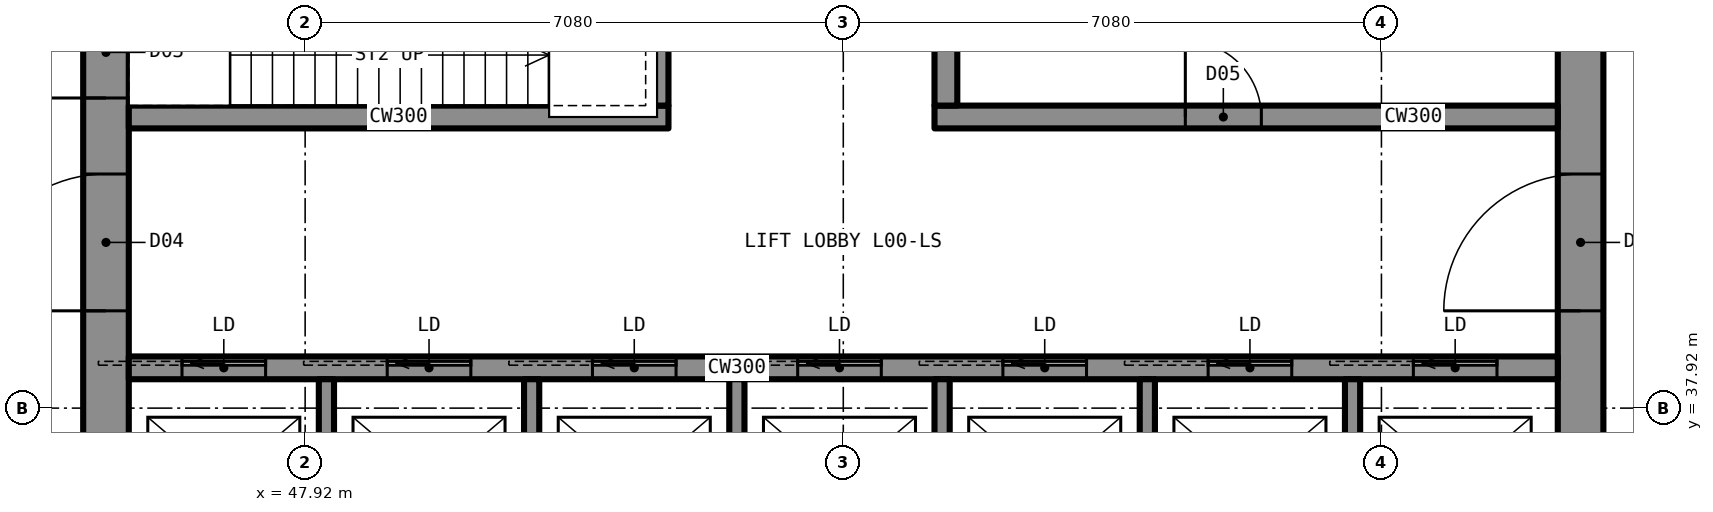
"""IFC4 building model, lengths in metres.
Left out: names, types, materials, properties, quantities, classifications, styles, units other than length and angle.
Written with IfcOpenShell. Run it as: python <this file> out.ifc"""

import sys

from ifc_helpers import new_model, si_unit, direction, frame, frame_2d, origin, place, context, subcontext, project, spatial, rectangle, extrude, element, fill, save


model = new_model("IFC4")
c1 = context("Model", 3, precision=1e-05, world=origin(), true_north=direction((0.0, 1.0)))
c2 = subcontext(c1, "Body", "Model", "MODEL_VIEW")
j1 = project(units=[si_unit("LENGTHUNIT", "METRE"), si_unit("PLANEANGLEUNIT", "RADIAN")], contexts=[c1])
p1 = place(None, origin())
s1 = spatial("IfcSite", under=j1, at=p1, CompositionType="ELEMENT")
p2 = place(p1, origin())
s2 = spatial("IfcBuilding", under=s1, at=p2, CompositionType="ELEMENT")
p3 = place(p2, origin())
s3 = spatial("IfcBuildingStorey", under=s2, at=p3, CompositionType="ELEMENT", Elevation=0.0)
p4 = place(p3, frame((64.7, 35.6, 0.0), z_axis=(0.0, 0.0, 1.0), x_axis=(0.0, 1.0, 0.0)))
e1 = element("IfcWall", 1, at=p4, inside=s3, PredefinedType="SHEAR", context=c2, shape_type="SweptSolid", body=[
    extrude(rectangle(XDim=18.8, YDim=0.6, at=frame_2d((9.4, 0.0))), origin(), (0.0, 0.0, 1.0), 5.6),
])
p5 = place(p4, frame((13.4, 0.0, 0.0)))
e2 = element("IfcOpeningElement", 2, at=p5, cuts=e1, PredefinedType="OPENING", context=c2, shape_type="SweptSolid", body=[
    extrude(rectangle(XDim=1.8, YDim=2.2, at=frame_2d((0.9, 1.1))), frame((0.0, 0.31, 0.0), z_axis=(0.0, -1.0, 0.0), x_axis=(1.0, 0.0, 0.0)), (0.0, 0.0, 1.0), 0.62),
])
p6 = place(p4, frame((3.6, 0.0, 0.0)))
e3 = element("IfcOpeningElement", 3, at=p6, cuts=e1, PredefinedType="OPENING", context=c2, shape_type="SweptSolid", body=[
    extrude(rectangle(XDim=1.8, YDim=2.2, at=frame_2d((0.9, 1.1))), frame((0.0, 0.31, 0.0), z_axis=(0.0, -1.0, 0.0), x_axis=(1.0, 0.0, 0.0)), (0.0, 0.0, 1.0), 0.62),
])
p7 = place(p3, frame((45.3, 35.6, 0.0), z_axis=(0.0, 0.0, 1.0), x_axis=(0.0, 1.0, 0.0)))
e4 = element("IfcWall", 4, at=p7, inside=s3, PredefinedType="SHEAR", context=c2, shape_type="SweptSolid", body=[
    extrude(rectangle(XDim=18.8, YDim=0.6, at=frame_2d((9.4, 0.0))), origin(), (0.0, 0.0, 1.0), 5.6),
])
p8 = place(p7, frame((13.4, 0.0, 0.0)))
e5 = element("IfcOpeningElement", 5, at=p8, cuts=e4, PredefinedType="OPENING", context=c2, shape_type="SweptSolid", body=[
    extrude(rectangle(XDim=1.8, YDim=2.2, at=frame_2d((0.9, 1.1))), frame((0.0, 0.31, 0.0), z_axis=(0.0, -1.0, 0.0), x_axis=(1.0, 0.0, 0.0)), (0.0, 0.0, 1.0), 0.62),
])
p9 = place(p7, frame((3.6, 0.0, 0.0)))
e6 = element("IfcOpeningElement", 6, at=p9, cuts=e4, PredefinedType="OPENING", context=c2, shape_type="SweptSolid", body=[
    extrude(rectangle(XDim=1.8, YDim=2.2, at=frame_2d((0.9, 1.1))), frame((0.0, 0.31, 0.0), z_axis=(0.0, -1.0, 0.0), x_axis=(1.0, 0.0, 0.0)), (0.0, 0.0, 1.0), 0.62),
])
p10 = place(p7, frame((6.4, 0.0, 0.0)))
e7 = element("IfcOpeningElement", 7, at=p10, cuts=e4, PredefinedType="OPENING", context=c2, shape_type="SweptSolid", body=[
    extrude(rectangle(XDim=1.2, YDim=2.2, at=frame_2d((0.6, 1.1))), frame((0.0, 0.31, 0.0), z_axis=(0.0, -1.0, 0.0), x_axis=(1.0, 0.0, 0.0)), (0.0, 0.0, 1.0), 0.62),
])
p11 = place(p3, frame((45.6, 38.45, 0.0), z_axis=(0.0, 0.0, 1.0), x_axis=(1.0, 0.0, 0.0)))
e8 = element("IfcWall", 8, at=p11, inside=s3, PredefinedType="SHEAR", context=c2, shape_type="SweptSolid", body=[
    extrude(rectangle(XDim=18.8, YDim=0.3, at=frame_2d((9.4, 0.0))), origin(), (0.0, 0.0, 1.0), 5.6),
])
p12 = place(p11, frame((0.7, 0.0, 0.0)))
e9 = element("IfcOpeningElement", 9, at=p12, cuts=e8, PredefinedType="OPENING", context=c2, shape_type="SweptSolid", body=[
    extrude(rectangle(XDim=1.1, YDim=2.2, at=frame_2d((0.55, 1.1))), frame((0.0, 0.16, 0.0), z_axis=(0.0, -1.0, 0.0), x_axis=(1.0, 0.0, 0.0)), (0.0, 0.0, 1.0), 0.32),
])
p13 = place(p11, frame((3.4, 0.0, 0.0)))
e10 = element("IfcOpeningElement", 10, at=p13, cuts=e8, PredefinedType="OPENING", context=c2, shape_type="SweptSolid", body=[
    extrude(rectangle(XDim=1.1, YDim=2.2, at=frame_2d((0.55, 1.1))), frame((0.0, 0.16, 0.0), z_axis=(0.0, -1.0, 0.0), x_axis=(1.0, 0.0, 0.0)), (0.0, 0.0, 1.0), 0.32),
])
p14 = place(p11, frame((6.1, 0.0, 0.0)))
e11 = element("IfcOpeningElement", 11, at=p14, cuts=e8, PredefinedType="OPENING", context=c2, shape_type="SweptSolid", body=[
    extrude(rectangle(XDim=1.1, YDim=2.2, at=frame_2d((0.55, 1.1))), frame((0.0, 0.16, 0.0), z_axis=(0.0, -1.0, 0.0), x_axis=(1.0, 0.0, 0.0)), (0.0, 0.0, 1.0), 0.32),
])
p15 = place(p11, frame((8.8, 0.0, 0.0)))
e12 = element("IfcOpeningElement", 12, at=p15, cuts=e8, PredefinedType="OPENING", context=c2, shape_type="SweptSolid", body=[
    extrude(rectangle(XDim=1.1, YDim=2.2, at=frame_2d((0.55, 1.1))), frame((0.0, 0.16, 0.0), z_axis=(0.0, -1.0, 0.0), x_axis=(1.0, 0.0, 0.0)), (0.0, 0.0, 1.0), 0.32),
])
p16 = place(p11, frame((11.5, 0.0, 0.0)))
e13 = element("IfcOpeningElement", 13, at=p16, cuts=e8, PredefinedType="OPENING", context=c2, shape_type="SweptSolid", body=[
    extrude(rectangle(XDim=1.1, YDim=2.2, at=frame_2d((0.55, 1.1))), frame((0.0, 0.16, 0.0), z_axis=(0.0, -1.0, 0.0), x_axis=(1.0, 0.0, 0.0)), (0.0, 0.0, 1.0), 0.32),
])
p17 = place(p11, frame((14.2, 0.0, 0.0)))
e14 = element("IfcOpeningElement", 14, at=p17, cuts=e8, PredefinedType="OPENING", context=c2, shape_type="SweptSolid", body=[
    extrude(rectangle(XDim=1.1, YDim=2.2, at=frame_2d((0.55, 1.1))), frame((0.0, 0.16, 0.0), z_axis=(0.0, -1.0, 0.0), x_axis=(1.0, 0.0, 0.0)), (0.0, 0.0, 1.0), 0.32),
])
p18 = place(p11, frame((16.9, 0.0, 0.0)))
e15 = element("IfcOpeningElement", 15, at=p18, cuts=e8, PredefinedType="OPENING", context=c2, shape_type="SweptSolid", body=[
    extrude(rectangle(XDim=1.1, YDim=2.2, at=frame_2d((0.55, 1.1))), frame((0.0, 0.16, 0.0), z_axis=(0.0, -1.0, 0.0), x_axis=(1.0, 0.0, 0.0)), (0.0, 0.0, 1.0), 0.32),
])
p19 = place(p3, frame((45.6, 41.75, 0.0), z_axis=(0.0, 0.0, 1.0), x_axis=(1.0, 0.0, 0.0)))
e16 = element("IfcWall", 16, at=p19, inside=s3, PredefinedType="SHEAR", context=c2, shape_type="SweptSolid", body=[
    extrude(rectangle(XDim=7.1, YDim=0.3, at=frame_2d((3.55, 0.0))), origin(), (0.0, 0.0, 1.0), 5.6),
])
p20 = place(p3, frame((56.2, 41.75, 0.0), z_axis=(0.0, 0.0, 1.0), x_axis=(1.0, 0.0, 0.0)))
e17 = element("IfcWall", 17, at=p20, inside=s3, PredefinedType="SHEAR", context=c2, shape_type="SweptSolid", body=[
    extrude(rectangle(XDim=8.2, YDim=0.3, at=frame_2d((4.1, 0.0))), origin(), (0.0, 0.0, 1.0), 5.6),
])
p21 = place(p20, frame((3.3, 0.0, 0.0)))
e18 = element("IfcOpeningElement", 18, at=p21, cuts=e17, PredefinedType="OPENING", context=c2, shape_type="SweptSolid", body=[
    extrude(rectangle(XDim=1.0, YDim=2.1, at=frame_2d((0.5, 1.05))), frame((0.0, 0.16, 0.0), z_axis=(0.0, -1.0, 0.0), x_axis=(1.0, 0.0, 0.0)), (0.0, 0.0, 1.0), 0.32),
])
p22 = place(p3, frame((52.55, 41.9, 0.0), z_axis=(0.0, 0.0, 1.0), x_axis=(0.0, 1.0, 0.0)))
e19 = element("IfcWall", 19, at=p22, inside=s3, PredefinedType="SHEAR", context=c2, shape_type="SweptSolid", body=[
    extrude(rectangle(XDim=6.2, YDim=0.3, at=frame_2d((3.1, 0.0))), origin(), (0.0, 0.0, 1.0), 5.6),
])
p23 = place(p22, frame((4.125, 0.0, 0.0)))
e20 = element("IfcOpeningElement", 20, at=p23, cuts=e19, PredefinedType="OPENING", context=c2, shape_type="SweptSolid", body=[
    extrude(rectangle(XDim=1.2, YDim=2.2, at=frame_2d((0.6, 1.1))), frame((0.0, 0.16, 0.0), z_axis=(0.0, -1.0, 0.0), x_axis=(1.0, 0.0, 0.0)), (0.0, 0.0, 1.0), 0.32),
])
p24 = place(p3, frame((56.35, 41.9, 0.0), z_axis=(0.0, 0.0, 1.0), x_axis=(0.0, 1.0, 0.0)))
e21 = element("IfcWall", 21, at=p24, inside=s3, PredefinedType="SHEAR", context=c2, shape_type="SweptSolid", body=[
    extrude(rectangle(XDim=9.5, YDim=0.3, at=frame_2d((4.75, 0.0))), origin(), (0.0, 0.0, 1.0), 5.6),
])
p25 = place(p24, frame((7.1, 0.0, 0.0)))
e22 = element("IfcOpeningElement", 22, at=p25, cuts=e21, PredefinedType="OPENING", context=c2, shape_type="SweptSolid", body=[
    extrude(rectangle(XDim=1.8, YDim=2.2, at=frame_2d((0.9, 1.1))), frame((0.0, 0.16, 0.0), z_axis=(0.0, -1.0, 0.0), x_axis=(1.0, 0.0, 0.0)), (0.0, 0.0, 1.0), 0.32),
])
for number, where, z_axis, x_axis in (
    (23, (48.2, 35.6, 0.0), (0.0, 0.0, 1.0), (0.0, 1.0, 0.0)),
    (24, (50.9, 35.6, 0.0), (0.0, 0.0, 1.0), (0.0, 1.0, 0.0)),
    (25, (53.6, 35.6, 0.0), (0.0, 0.0, 1.0), (0.0, 1.0, 0.0)),
    (26, (56.3, 35.6, 0.0), (0.0, 0.0, 1.0), (0.0, 1.0, 0.0)),
    (27, (59.0, 35.6, 0.0), (0.0, 0.0, 1.0), (0.0, 1.0, 0.0)),
    (28, (61.7, 35.6, 0.0), (0.0, 0.0, 1.0), (0.0, 1.0, 0.0)),
):
    element("IfcWall", number, at=place(p3, frame(where, z_axis=z_axis, x_axis=x_axis)), inside=s3, PredefinedType="PARTITIONING", context=c2, shape_type="SweptSolid", body=[
        extrude(rectangle(XDim=2.7, YDim=0.2, at=frame_2d((1.35, 0.0))), origin(), (0.0, 0.0, 1.0), 5.25),
    ])
p26 = place(p9, origin())
e29 = element("IfcDoor", 29, at=p26, inside=s3, OperationType="DOUBLE_DOOR_SINGLE_SWING", PredefinedType="DOOR", context=c2, shape_type="SweptSolid", body=[
    extrude(rectangle(XDim=1.8, YDim=2.2, at=frame_2d((0.9, 1.1))), frame((0.0, 0.025, 0.0), z_axis=(0.0, -1.0, 0.0), x_axis=(1.0, 0.0, 0.0)), (0.0, 0.0, 1.0), 0.05),
])
fill(e6, e29)
p27 = place(p6, origin())
e30 = element("IfcDoor", 30, at=p27, inside=s3, OperationType="DOUBLE_DOOR_SINGLE_SWING", PredefinedType="DOOR", context=c2, shape_type="SweptSolid", body=[
    extrude(rectangle(XDim=1.8, YDim=2.2, at=frame_2d((0.9, 1.1))), frame((0.0, 0.025, 0.0), z_axis=(0.0, -1.0, 0.0), x_axis=(1.0, 0.0, 0.0)), (0.0, 0.0, 1.0), 0.05),
])
fill(e3, e30)
p28 = place(p10, origin())
e31 = element("IfcDoor", 31, at=p28, inside=s3, OperationType="SINGLE_SWING_LEFT", PredefinedType="DOOR", context=c2, shape_type="SweptSolid", body=[
    extrude(rectangle(XDim=1.2, YDim=2.2, at=frame_2d((0.6, 1.1))), frame((0.0, 0.025, 0.0), z_axis=(0.0, -1.0, 0.0), x_axis=(1.0, 0.0, 0.0)), (0.0, 0.0, 1.0), 0.05),
])
fill(e7, e31)
p29 = place(p21, origin())
e32 = element("IfcDoor", 32, at=p29, inside=s3, OperationType="SINGLE_SWING_LEFT", PredefinedType="DOOR", context=c2, shape_type="SweptSolid", body=[
    extrude(rectangle(XDim=1.0, YDim=2.1, at=frame_2d((0.5, 1.05))), frame((0.0, 0.025, 0.0), z_axis=(0.0, -1.0, 0.0), x_axis=(1.0, 0.0, 0.0)), (0.0, 0.0, 1.0), 0.05),
])
fill(e18, e32)
p30 = place(p12, origin())
e33 = element("IfcDoor", 33, at=p30, inside=s3, OperationType="SLIDING_TO_LEFT", PredefinedType="DOOR", context=c2, shape_type="SweptSolid", body=[
    extrude(rectangle(XDim=1.1, YDim=2.2, at=frame_2d((0.55, 1.1))), frame((0.0, 0.025, 0.0), z_axis=(0.0, -1.0, 0.0), x_axis=(1.0, 0.0, 0.0)), (0.0, 0.0, 1.0), 0.05),
])
fill(e9, e33)
p31 = place(p13, origin())
e34 = element("IfcDoor", 34, at=p31, inside=s3, OperationType="SLIDING_TO_LEFT", PredefinedType="DOOR", context=c2, shape_type="SweptSolid", body=[
    extrude(rectangle(XDim=1.1, YDim=2.2, at=frame_2d((0.55, 1.1))), frame((0.0, 0.025, 0.0), z_axis=(0.0, -1.0, 0.0), x_axis=(1.0, 0.0, 0.0)), (0.0, 0.0, 1.0), 0.05),
])
fill(e10, e34)
p32 = place(p14, origin())
e35 = element("IfcDoor", 35, at=p32, inside=s3, OperationType="SLIDING_TO_LEFT", PredefinedType="DOOR", context=c2, shape_type="SweptSolid", body=[
    extrude(rectangle(XDim=1.1, YDim=2.2, at=frame_2d((0.55, 1.1))), frame((0.0, 0.025, 0.0), z_axis=(0.0, -1.0, 0.0), x_axis=(1.0, 0.0, 0.0)), (0.0, 0.0, 1.0), 0.05),
])
fill(e11, e35)
p33 = place(p15, origin())
e36 = element("IfcDoor", 36, at=p33, inside=s3, OperationType="SLIDING_TO_LEFT", PredefinedType="DOOR", context=c2, shape_type="SweptSolid", body=[
    extrude(rectangle(XDim=1.1, YDim=2.2, at=frame_2d((0.55, 1.1))), frame((0.0, 0.025, 0.0), z_axis=(0.0, -1.0, 0.0), x_axis=(1.0, 0.0, 0.0)), (0.0, 0.0, 1.0), 0.05),
])
fill(e12, e36)
p34 = place(p16, origin())
e37 = element("IfcDoor", 37, at=p34, inside=s3, OperationType="SLIDING_TO_LEFT", PredefinedType="DOOR", context=c2, shape_type="SweptSolid", body=[
    extrude(rectangle(XDim=1.1, YDim=2.2, at=frame_2d((0.55, 1.1))), frame((0.0, 0.025, 0.0), z_axis=(0.0, -1.0, 0.0), x_axis=(1.0, 0.0, 0.0)), (0.0, 0.0, 1.0), 0.05),
])
fill(e13, e37)
p35 = place(p17, origin())
e38 = element("IfcDoor", 38, at=p35, inside=s3, OperationType="SLIDING_TO_LEFT", PredefinedType="DOOR", context=c2, shape_type="SweptSolid", body=[
    extrude(rectangle(XDim=1.1, YDim=2.2, at=frame_2d((0.55, 1.1))), frame((0.0, 0.025, 0.0), z_axis=(0.0, -1.0, 0.0), x_axis=(1.0, 0.0, 0.0)), (0.0, 0.0, 1.0), 0.05),
])
fill(e14, e38)
p36 = place(p18, origin())
e39 = element("IfcDoor", 39, at=p36, inside=s3, OperationType="SLIDING_TO_LEFT", PredefinedType="DOOR", context=c2, shape_type="SweptSolid", body=[
    extrude(rectangle(XDim=1.1, YDim=2.2, at=frame_2d((0.55, 1.1))), frame((0.0, 0.025, 0.0), z_axis=(0.0, -1.0, 0.0), x_axis=(1.0, 0.0, 0.0)), (0.0, 0.0, 1.0), 0.05),
])
fill(e15, e39)
save(model, sys.argv[1])
